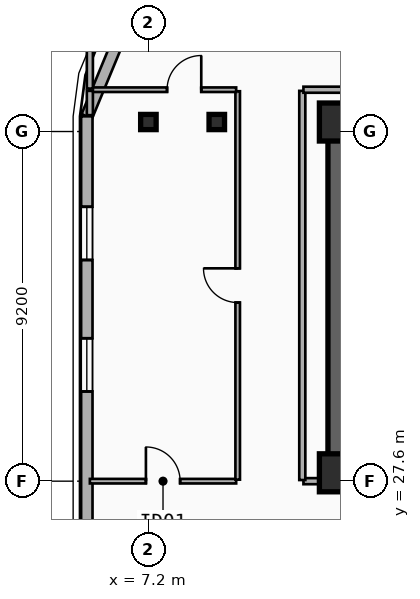
"""IFC4 building model, lengths in metres.
Left out: names, types, materials, properties, quantities, classifications, styles, units other than length and angle.
Written with IfcOpenShell. Run it as: python <this file> out.ifc"""

import sys

from ifc_helpers import new_model, si_unit, direction, frame, frame_2d, origin, origin_2d, place, context, subcontext, project, spatial, rectangle, i_section, extrude, element, fill, save


model = new_model("IFC4")
c1 = context("Model", 3, precision=1e-05, world=origin(), true_north=direction((0.0, 1.0)))
c2 = subcontext(c1, "Body", "Model", "MODEL_VIEW")
j1 = project(units=[si_unit("LENGTHUNIT", "METRE"), si_unit("PLANEANGLEUNIT", "RADIAN")], contexts=[c1])
p1 = place(None, origin())
s1 = spatial("IfcSite", under=j1, at=p1, CompositionType="ELEMENT")
p2 = place(p1, origin())
s2 = spatial("IfcBuilding", under=s1, at=p2, CompositionType="ELEMENT")
p3 = place(p2, frame((0.0, 0.0, 211.2)))
s3 = spatial("IfcBuildingStorey", under=s2, at=p3, CompositionType="ELEMENT", Elevation=211.2)
p4 = place(p3, frame((12.15, 37.05, 0.0), z_axis=(0.0, 0.0, 1.0), x_axis=(1.0, 0.0, 0.0)))
e1 = element("IfcWall", 1, at=p4, inside=s3, PredefinedType="SHEAR", context=c2, shape_type="SweptSolid", body=[
    extrude(rectangle(XDim=33.23, YDim=0.45, at=frame_2d((16.615, 0.0))), origin(), (0.0, 0.0, 1.0), 3.6),
])
p5 = place(p3, frame((21.18, 27.82, 0.0), z_axis=(0.0, 0.0, 1.0), x_axis=(-1.0, 0.0, 0.0)))
e2 = element("IfcWall", 2, at=p5, inside=s3, PredefinedType="SHEAR", context=c2, shape_type="SweptSolid", body=[
    extrude(rectangle(XDim=9.03, YDim=0.45, at=frame_2d((4.515, 0.0))), origin(), (0.0, 0.0, 1.0), 3.6),
])
p6 = place(p5, frame((2.68, 0.0, 0.0)))
e3 = element("IfcOpeningElement", 3, at=p6, cuts=e2, PredefinedType="OPENING", context=c2, shape_type="SweptSolid", body=[
    extrude(rectangle(XDim=1.1, YDim=2.15, at=frame_2d((0.55, 1.075))), frame((0.0, 0.235, 0.0), z_axis=(0.0, -1.0, 0.0), x_axis=(1.0, 0.0, 0.0)), (0.0, 0.0, 1.0), 0.47),
])
p7 = place(p3, frame((12.15, 28.045, 0.0), z_axis=(0.0, 0.0, 1.0), x_axis=(0.0, 1.0, 0.0)))
e4 = element("IfcWall", 4, at=p7, inside=s3, PredefinedType="SHEAR", context=c2, shape_type="SweptSolid", body=[
    extrude(rectangle(XDim=8.78, YDim=0.45, at=frame_2d((4.39, 0.0))), origin(), (0.0, 0.0, 1.0), 3.6),
])
for number, where, z_axis, x_axis in (
    (5, (12.2, 27.82, 0.0), (0.0, 0.0, 1.0), (1.0, 0.0, 0.0)),
    (6, (12.2, 37.05, 0.0), (0.0, 0.0, 1.0), (1.0, 0.0, 0.0)),
):
    element("IfcColumn", number, at=place(p3, frame(where, z_axis=z_axis, x_axis=x_axis)), inside=s3, PredefinedType="COLUMN", context=c2, shape_type="SweptSolid", body=[
        extrude(rectangle(XDim=1.0, YDim=1.0, at=origin_2d()), origin(), (0.0, 0.0, 1.0), 3.6),
    ])
for number, where, z_axis, x_axis in (
    (7, (9.0, 37.05, 0.0), (0.0, 0.0, 1.0), (1.0, 0.0, 0.0)),
    (8, (7.2, 37.05, 0.0), (0.0, 0.0, 1.0), (1.0, 0.0, 0.0)),
):
    element("IfcColumn", number, at=place(p3, frame(where, z_axis=z_axis, x_axis=x_axis)), inside=s3, PredefinedType="COLUMN", context=c2, shape_type="SweptSolid", body=[
        extrude(i_section(OverallWidth=0.408, OverallDepth=0.4, WebThickness=0.025, FlangeThickness=0.039, FilletRadius=0.015, at=origin_2d()), origin(), (0.0, 0.0, 1.0), 3.6),
    ])
p8 = place(p3, frame((5.58, 37.2, 0.0), z_axis=(0.0, 0.0, 1.0), x_axis=(0.382636798336, 0.92389884758, 0.0)))
e9 = element("IfcWall", 9, at=p8, inside=s3, PredefinedType="SOLIDWALL", context=c2, shape_type="SweptSolid", body=[
    extrude(rectangle(XDim=3.077, YDim=0.3, at=frame_2d((1.538, 0.0))), origin(), (0.0, 0.0, 1.0), 3.34),
])
p9 = place(p3, frame((5.58, 8.6, 0.0), z_axis=(0.0, 0.0, 1.0), x_axis=(0.0, 1.0, 0.0)))
e10 = element("IfcWall", 10, at=p9, inside=s3, PredefinedType="SOLIDWALL", context=c2, shape_type="SweptSolid", body=[
    extrude(rectangle(XDim=28.6, YDim=0.3, at=frame_2d((14.3, 0.0))), origin(), (0.0, 0.0, 1.0), 3.34),
])
p10 = place(p9, frame((21.36, 0.0, 0.34)))
e11 = element("IfcOpeningElement", 11, at=p10, cuts=e10, PredefinedType="OPENING", context=c2, shape_type="SweptSolid", body=[
    extrude(rectangle(XDim=1.4, YDim=2.1, at=frame_2d((0.7, 1.05))), frame((0.0, 0.16, 0.0), z_axis=(0.0, -1.0, 0.0), x_axis=(1.0, 0.0, 0.0)), (0.0, 0.0, 1.0), 0.32),
])
p11 = place(p9, frame((24.82, 0.0, 0.34)))
e12 = element("IfcOpeningElement", 12, at=p11, cuts=e10, PredefinedType="OPENING", context=c2, shape_type="SweptSolid", body=[
    extrude(rectangle(XDim=1.4, YDim=2.1, at=frame_2d((0.7, 1.05))), frame((0.0, 0.16, 0.0), z_axis=(0.0, -1.0, 0.0), x_axis=(1.0, 0.0, 0.0)), (0.0, 0.0, 1.0), 0.32),
])
p12 = place(p9, frame((2.671, 0.0, 0.34)))
e13 = element("IfcOpeningElement", 13, at=p12, cuts=e10, PredefinedType="OPENING", context=c2, shape_type="SweptSolid", body=[
    extrude(rectangle(XDim=1.4, YDim=2.1, at=frame_2d((0.7, 1.05))), frame((0.0, 0.16, 0.0), z_axis=(0.0, -1.0, 0.0), x_axis=(1.0, 0.0, 0.0)), (0.0, 0.0, 1.0), 0.32),
])
p13 = place(p9, frame((6.679, 0.0, 0.34)))
e14 = element("IfcOpeningElement", 14, at=p13, cuts=e10, PredefinedType="OPENING", context=c2, shape_type="SweptSolid", body=[
    extrude(rectangle(XDim=1.4, YDim=2.1, at=frame_2d((0.7, 1.05))), frame((0.0, 0.16, 0.0), z_axis=(0.0, -1.0, 0.0), x_axis=(1.0, 0.0, 0.0)), (0.0, 0.0, 1.0), 0.32),
])
p14 = place(p9, frame((10.467, 0.0, 0.34)))
e15 = element("IfcOpeningElement", 15, at=p14, cuts=e10, PredefinedType="OPENING", context=c2, shape_type="SweptSolid", body=[
    extrude(rectangle(XDim=1.4, YDim=2.1, at=frame_2d((0.7, 1.05))), frame((0.0, 0.16, 0.0), z_axis=(0.0, -1.0, 0.0), x_axis=(1.0, 0.0, 0.0)), (0.0, 0.0, 1.0), 0.32),
])
p15 = place(p9, frame((14.256, 0.0, 0.34)))
e16 = element("IfcOpeningElement", 16, at=p15, cuts=e10, PredefinedType="OPENING", context=c2, shape_type="SweptSolid", body=[
    extrude(rectangle(XDim=1.4, YDim=2.1, at=frame_2d((0.7, 1.05))), frame((0.0, 0.16, 0.0), z_axis=(0.0, -1.0, 0.0), x_axis=(1.0, 0.0, 0.0)), (0.0, 0.0, 1.0), 0.32),
])
p16 = place(p3, frame((5.66, 27.6, 0.0), z_axis=(0.0, 0.0, 1.0), x_axis=(1.0, 0.0, 0.0)))
e17 = element("IfcWall", 17, at=p16, inside=s3, PredefinedType="PARTITIONING", context=c2, shape_type="SweptSolid", body=[
    extrude(rectangle(XDim=3.85, YDim=0.12, at=frame_2d((1.925, 0.0))), origin(), (0.0, 0.0, 1.0), 2.67),
])
p17 = place(p16, frame((1.475, 0.0, 0.0)))
e18 = element("IfcOpeningElement", 18, at=p17, cuts=e17, PredefinedType="OPENING", context=c2, shape_type="SweptSolid", body=[
    extrude(rectangle(XDim=0.9, YDim=2.1, at=frame_2d((0.45, 1.05))), frame((0.0, 0.07, 0.0), z_axis=(0.0, -1.0, 0.0), x_axis=(1.0, 0.0, 0.0)), (0.0, 0.0, 1.0), 0.14),
])
p18 = place(p3, frame((9.55, 27.64, 0.0), z_axis=(0.0, 0.0, 1.0), x_axis=(0.0, 1.0, 0.0)))
e19 = element("IfcWall", 19, at=p18, inside=s3, PredefinedType="PARTITIONING", context=c2, shape_type="SweptSolid", body=[
    extrude(rectangle(XDim=10.22, YDim=0.12, at=frame_2d((5.11, 0.0))), origin(), (0.0, 0.0, 1.0), 2.82),
])
p19 = place(p18, frame((4.66, 0.0, 0.0)))
e20 = element("IfcOpeningElement", 20, at=p19, cuts=e19, PredefinedType="OPENING", context=c2, shape_type="SweptSolid", body=[
    extrude(rectangle(XDim=0.9, YDim=2.1, at=frame_2d((0.45, 1.05))), frame((0.0, 0.07, 0.0), z_axis=(0.0, -1.0, 0.0), x_axis=(1.0, 0.0, 0.0)), (0.0, 0.0, 1.0), 0.14),
])
p20 = place(p3, frame((5.66, 37.9, 0.0), z_axis=(0.0, 0.0, 1.0), x_axis=(1.0, 0.0, 0.0)))
e21 = element("IfcWall", 21, at=p20, inside=s3, PredefinedType="PARTITIONING", context=c2, shape_type="SweptSolid", body=[
    extrude(rectangle(XDim=3.85, YDim=0.12, at=frame_2d((1.925, 0.0))), origin(), (0.0, 0.0, 1.0), 3.34),
])
p21 = place(p20, frame((2.031, 0.0, 0.0)))
e22 = element("IfcOpeningElement", 22, at=p21, cuts=e21, PredefinedType="OPENING", context=c2, shape_type="SweptSolid", body=[
    extrude(rectangle(XDim=0.9, YDim=2.1, at=frame_2d((0.45, 1.05))), frame((0.0, 0.07, 0.0), z_axis=(0.0, -1.0, 0.0), x_axis=(1.0, 0.0, 0.0)), (0.0, 0.0, 1.0), 0.14),
])
p22 = place(p3, frame((11.28, 27.6, 0.0), z_axis=(0.0, 0.0, 1.0), x_axis=(1.0, 0.0, 0.0)))
e23 = element("IfcWall", 23, at=p22, inside=s3, PredefinedType="PARTITIONING", context=c2, shape_type="SweptSolid", body=[
    extrude(rectangle(XDim=0.84, YDim=0.16, at=frame_2d((0.42, 0.0))), origin(), (0.0, 0.0, 1.0), 2.41),
])
p23 = place(p3, frame((11.25, 27.63, 0.0), z_axis=(0.0, 0.0, 1.0), x_axis=(0.0, 1.0, 0.0)))
e24 = element("IfcWall", 24, at=p23, inside=s3, PredefinedType="PARTITIONING", context=c2, shape_type="SweptSolid", body=[
    extrude(rectangle(XDim=10.24, YDim=0.16, at=frame_2d((5.12, 0.0))), origin(), (0.0, 0.0, 1.0), 2.82),
])
p24 = place(p3, frame((11.28, 37.9, 0.0), z_axis=(0.0, 0.0, 1.0), x_axis=(1.0, 0.0, 0.0)))
e25 = element("IfcWall", 25, at=p24, inside=s3, PredefinedType="PARTITIONING", context=c2, shape_type="SweptSolid", body=[
    extrude(rectangle(XDim=35.04, YDim=0.16, at=frame_2d((17.52, 0.0))), origin(), (0.0, 0.0, 1.0), 3.34),
])
p25 = place(p3, frame((5.66, 37.93, 0.0), z_axis=(0.0, 0.0, 1.0), x_axis=(0.0, 1.0, 0.0)))
e26 = element("IfcWall", 26, at=p25, inside=s3, PredefinedType="PARTITIONING", context=c2, shape_type="SweptSolid", body=[
    extrude(rectangle(XDim=1.44, YDim=0.16, at=frame_2d((0.72, 0.0))), origin(), (0.0, 0.0, 1.0), 3.34),
])
p26 = place(p3, frame((5.66, 37.23, 0.0), z_axis=(0.0, 0.0, 1.0), x_axis=(0.0, 1.0, 0.0)))
e27 = element("IfcWall", 27, at=p26, inside=s3, PredefinedType="PARTITIONING", context=c2, shape_type="SweptSolid", body=[
    extrude(rectangle(XDim=0.64, YDim=0.16, at=frame_2d((0.32, 0.0))), origin(), (0.0, 0.0, 1.0), 3.34),
])
p27 = place(p10, origin())
e28 = element("IfcWindow", 28, at=p27, inside=s3, PartitioningType="SINGLE_PANEL", PredefinedType="WINDOW", context=c2, shape_type="SweptSolid", body=[
    extrude(rectangle(XDim=1.4, YDim=2.1, at=frame_2d((0.7, 1.05))), frame((0.0, 0.03, 0.0), z_axis=(0.0, -1.0, 0.0), x_axis=(1.0, 0.0, 0.0)), (0.0, 0.0, 1.0), 0.06),
])
fill(e11, e28)
p28 = place(p11, origin())
e29 = element("IfcWindow", 29, at=p28, inside=s3, PartitioningType="SINGLE_PANEL", PredefinedType="WINDOW", context=c2, shape_type="SweptSolid", body=[
    extrude(rectangle(XDim=1.4, YDim=2.1, at=frame_2d((0.7, 1.05))), frame((0.0, 0.03, 0.0), z_axis=(0.0, -1.0, 0.0), x_axis=(1.0, 0.0, 0.0)), (0.0, 0.0, 1.0), 0.06),
])
fill(e12, e29)
p29 = place(p17, origin())
e30 = element("IfcDoor", 30, at=p29, inside=s3, OperationType="SINGLE_SWING_LEFT", PredefinedType="DOOR", context=c2, shape_type="SweptSolid", body=[
    extrude(rectangle(XDim=0.9, YDim=2.1, at=frame_2d((0.45, 1.05))), frame((0.0, 0.025, 0.0), z_axis=(0.0, -1.0, 0.0), x_axis=(1.0, 0.0, 0.0)), (0.0, 0.0, 1.0), 0.05),
])
fill(e18, e30)
p30 = place(p19, origin())
e31 = element("IfcDoor", 31, at=p30, inside=s3, OperationType="SINGLE_SWING_RIGHT", PredefinedType="DOOR", context=c2, shape_type="SweptSolid", body=[
    extrude(rectangle(XDim=0.9, YDim=2.1, at=frame_2d((0.45, 1.05))), frame((0.0, 0.025, 0.0), z_axis=(0.0, -1.0, 0.0), x_axis=(1.0, 0.0, 0.0)), (0.0, 0.0, 1.0), 0.05),
])
fill(e20, e31)
p31 = place(p21, origin())
e32 = element("IfcDoor", 32, at=p31, inside=s3, OperationType="SINGLE_SWING_RIGHT", PredefinedType="DOOR", context=c2, shape_type="SweptSolid", body=[
    extrude(rectangle(XDim=0.9, YDim=2.1, at=frame_2d((0.45, 1.05))), frame((0.0, 0.025, 0.0), z_axis=(0.0, -1.0, 0.0), x_axis=(1.0, 0.0, 0.0)), (0.0, 0.0, 1.0), 0.05),
])
fill(e22, e32)
save(model, sys.argv[1])
